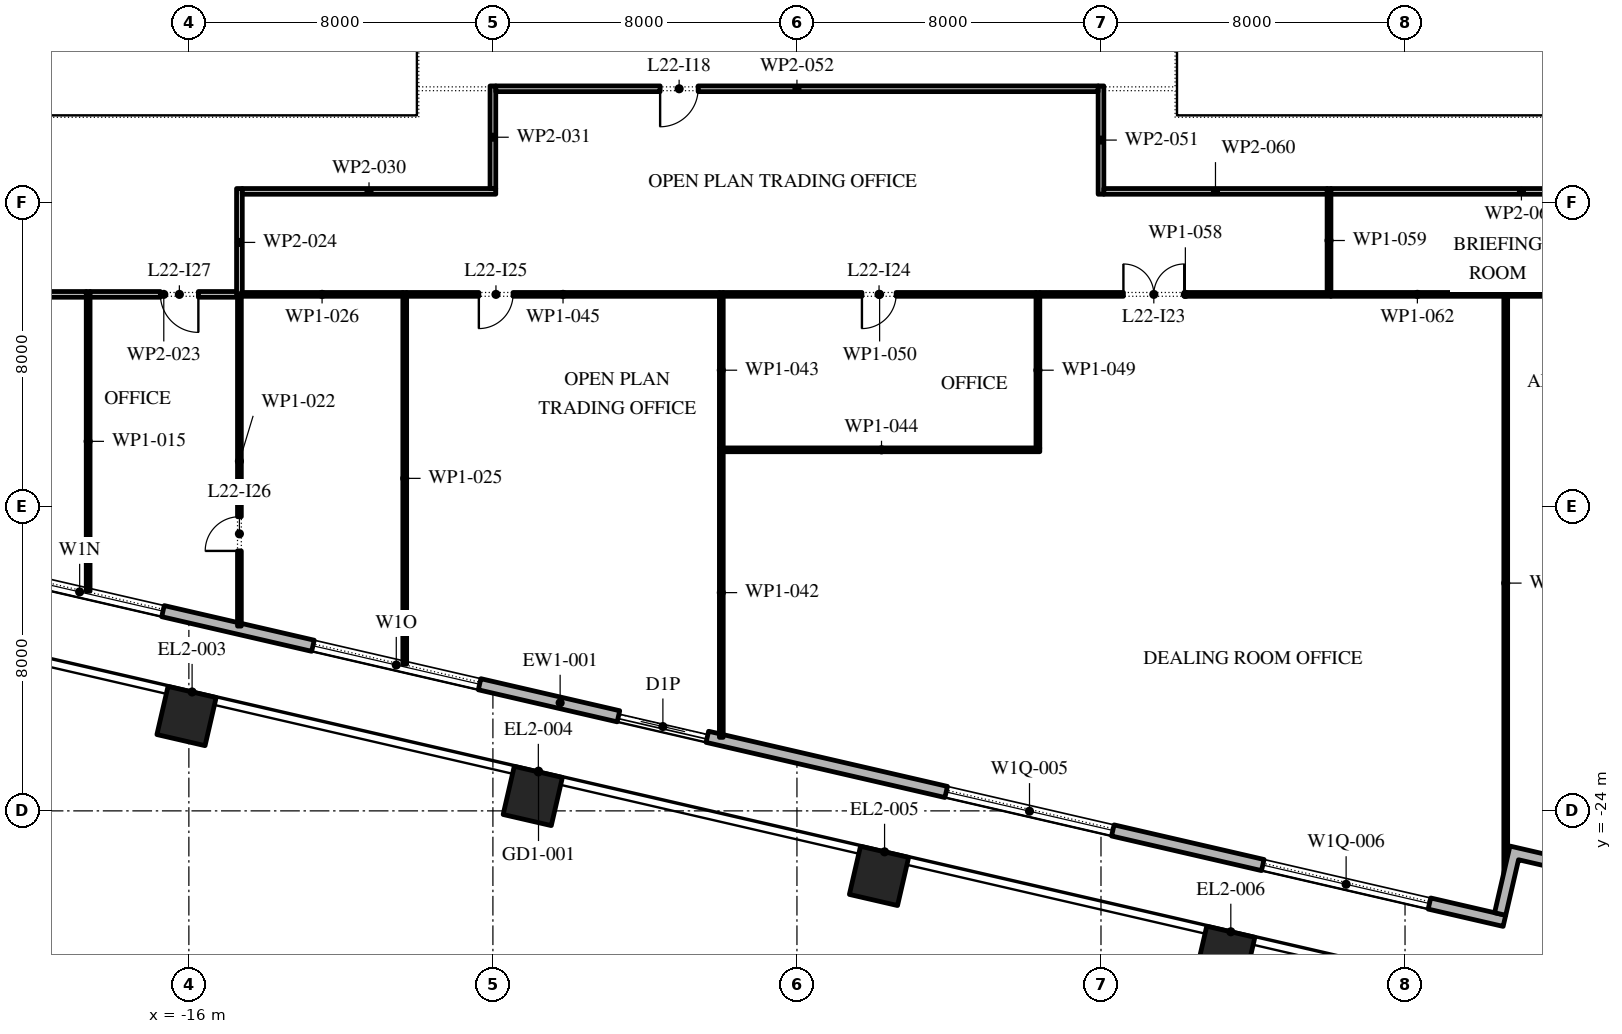
"""IFC4 building model, lengths in metres.
Left out: names, types, materials, properties, quantities, classifications, styles, units other than length and angle.
Written with IfcOpenShell. Run it as: python <this file> out.ifc"""

import sys

from ifc_helpers import new_model, si_unit, direction, frame, frame_2d, origin, origin_2d, place, context, subcontext, project, spatial, polyline, rectangle, outline, extrude, element, fill, save


model = new_model("IFC4")
c1 = context("Model", 3, precision=1e-05, world=origin(), true_north=direction((0.0, 1.0)))
c2 = subcontext(c1, "Body", "Model", "MODEL_VIEW")
j1 = project(units=[si_unit("LENGTHUNIT", "METRE"), si_unit("PLANEANGLEUNIT", "RADIAN")], contexts=[c1])
p1 = place(None, origin())
s1 = spatial("IfcSite", under=j1, at=p1, CompositionType="ELEMENT")
p2 = place(p1, origin())
s2 = spatial("IfcBuilding", under=s1, at=p2, CompositionType="ELEMENT")
p3 = place(p2, frame((0.0, 0.0, 105.6)))
s3 = spatial("IfcBuildingStorey", under=s2, at=p3, CompositionType="ELEMENT", Elevation=105.6)
for number, where, z_axis, x_axis in (
    (1, (-16.061, -21.505, 0.0), (0.0, 0.0, 1.0), (0.974, -0.225, 0.0)),
    (2, (-6.951, -23.608, 0.0), (0.0, 0.0, 1.0), (0.974, -0.225, 0.0)),
    (3, (2.159, -25.711, 0.0), (0.0, 0.0, 1.0), (0.974, -0.225, 0.0)),
    (4, (11.27, -27.815, 0.0), (0.0, 0.0, 1.0), (0.974, -0.225, 0.0)),
):
    element("IfcColumn", number, at=place(p3, frame(where, z_axis=z_axis, x_axis=x_axis)), inside=s3, PredefinedType="COLUMN", context=c2, shape_type="SweptSolid", body=[
        extrude(rectangle(XDim=1.3, YDim=1.3, at=origin_2d()), origin(), (0.0, 0.0, 1.0), 4.2),
    ])
p4 = place(p3, frame((-31.078, -15.421, 0.0), z_axis=(0.0, 0.0, 1.0), x_axis=(0.974370456532, -0.224949357493, 0.0)))
e5 = element("IfcWall", 5, at=p4, inside=s3, PredefinedType="STANDARD", context=c2, shape_type="SweptSolid", body=[
    extrude(rectangle(XDim=51.0, YDim=0.3, at=frame_2d((25.5, 0.0))), origin(), (0.0, 0.0, 1.0), 4.0),
])
p5 = place(p4, frame((1.875, 0.0, 0.45)))
e6 = element("IfcOpeningElement", 6, at=p5, cuts=e5, PredefinedType="OPENING", context=c2, shape_type="SweptSolid", body=[
    extrude(rectangle(XDim=4.5, YDim=2.65, at=frame_2d((2.25, 1.325))), frame((0.0, 0.16, 0.0), z_axis=(0.0, -1.0, 0.0), x_axis=(1.0, 0.0, 0.0)), (0.0, 0.0, 1.0), 0.32),
])
p6 = place(p4, frame((10.275, 0.0, 0.45)))
e7 = element("IfcOpeningElement", 7, at=p6, cuts=e5, PredefinedType="OPENING", context=c2, shape_type="SweptSolid", body=[
    extrude(rectangle(XDim=4.5, YDim=2.525, at=frame_2d((2.25, 1.262))), frame((0.0, 0.16, 0.0), z_axis=(0.0, -1.0, 0.0), x_axis=(1.0, 0.0, 0.0)), (0.0, 0.0, 1.0), 0.32),
])
p7 = place(p4, frame((18.825, 0.0, 0.45)))
e8 = element("IfcOpeningElement", 8, at=p7, cuts=e5, PredefinedType="OPENING", context=c2, shape_type="SweptSolid", body=[
    extrude(rectangle(XDim=4.5, YDim=2.5, at=frame_2d((2.25, 1.25))), frame((0.0, 0.16, 0.0), z_axis=(0.0, -1.0, 0.0), x_axis=(1.0, 0.0, 0.0)), (0.0, 0.0, 1.0), 0.32),
])
p8 = place(p4, frame((27.075, 0.0, 0.0)))
e9 = element("IfcOpeningElement", 9, at=p8, cuts=e5, PredefinedType="OPENING", context=c2, shape_type="SweptSolid", body=[
    extrude(rectangle(XDim=2.4, YDim=2.9, at=frame_2d((1.2, 1.45))), frame((0.0, 0.16, 0.0), z_axis=(0.0, -1.0, 0.0), x_axis=(1.0, 0.0, 0.0)), (0.0, 0.0, 1.0), 0.32),
])
p9 = place(p4, frame((35.925, 0.0, 0.45)))
e10 = element("IfcOpeningElement", 10, at=p9, cuts=e5, PredefinedType="OPENING", context=c2, shape_type="SweptSolid", body=[
    extrude(rectangle(XDim=4.5, YDim=2.45, at=frame_2d((2.25, 1.225))), frame((0.0, 0.16, 0.0), z_axis=(0.0, -1.0, 0.0), x_axis=(1.0, 0.0, 0.0)), (0.0, 0.0, 1.0), 0.32),
])
p10 = place(p4, frame((44.475, 0.0, 0.45)))
e11 = element("IfcOpeningElement", 11, at=p10, cuts=e5, PredefinedType="OPENING", context=c2, shape_type="SweptSolid", body=[
    extrude(rectangle(XDim=4.5, YDim=2.45, at=frame_2d((2.25, 1.225))), frame((0.0, 0.16, 0.0), z_axis=(0.0, -1.0, 0.0), x_axis=(1.0, 0.0, 0.0)), (0.0, 0.0, 1.0), 0.32),
])
p11 = place(p3, origin())
e12 = element("IfcWall", 12, at=p11, inside=s3, PredefinedType="STANDARD", context=c2, shape_type="SweptSolid", body=[
    extrude(outline(polyline([(20.515, -25.331), (20.92, -23.577), (22.967, -24.049), (22.899, -24.342), (21.145, -23.937), (20.74, -25.691), (18.986, -25.286), (18.649, -26.747), (18.357, -26.68), (18.762, -24.926), (20.515, -25.331)])), origin(), (0.0, 0.0, 1.0), 4.0),
])
p12 = place(p3, frame((-18.65, -18.219, 0.0), z_axis=(0.0, 0.0, 1.0), x_axis=(0.0, 1.0, 0.0)))
e13 = element("IfcWall", 13, at=p12, inside=s3, PredefinedType="PARTITIONING", context=c2, shape_type="SweptSolid", body=[
    extrude(rectangle(XDim=7.884, YDim=0.1, at=frame_2d((3.942, 0.0))), origin(), (0.0, 0.0, 1.0), 4.0),
])
p13 = place(p3, frame((-18.7, -10.41, 0.0), z_axis=(0.0, 0.0, 1.0), x_axis=(-1.0, 0.0, 0.0)))
e14 = element("IfcWall", 14, at=p13, inside=s3, PredefinedType="PARTITIONING", context=c2, shape_type="SweptSolid", body=[
    extrude(rectangle(XDim=3.8, YDim=0.15, at=frame_2d((1.9, 0.0))), origin(), (0.0, 0.0, 1.0), 4.0),
])
p14 = place(p13, frame((1.4, 0.0, 0.0)))
e15 = element("IfcOpeningElement", 15, at=p14, cuts=e14, PredefinedType="OPENING", context=c2, shape_type="SweptSolid", body=[
    extrude(rectangle(XDim=1.0, YDim=2.1, at=frame_2d((0.5, 1.05))), frame((0.0, 0.085, 0.0), z_axis=(0.0, -1.0, 0.0), x_axis=(1.0, 0.0, 0.0)), (0.0, 0.0, 1.0), 0.17),
])
p15 = place(p3, frame((-14.67, -19.138, 0.0), z_axis=(0.0, 0.0, 1.0), x_axis=(0.0, 1.0, 0.0)))
e16 = element("IfcWall", 16, at=p15, inside=s3, PredefinedType="PARTITIONING", context=c2, shape_type="SweptSolid", body=[
    extrude(rectangle(XDim=8.678, YDim=0.1, at=frame_2d((4.339, 0.0))), origin(), (0.0, 0.0, 1.0), 4.0),
])
p16 = place(p15, frame((1.978, 0.0, 0.0)))
e17 = element("IfcOpeningElement", 17, at=p16, cuts=e16, PredefinedType="OPENING", context=c2, shape_type="SweptSolid", body=[
    extrude(rectangle(XDim=0.9, YDim=2.1, at=frame_2d((0.45, 1.05))), frame((0.0, 0.06, 0.0), z_axis=(0.0, -1.0, 0.0), x_axis=(1.0, 0.0, 0.0)), (0.0, 0.0, 1.0), 0.12),
])
p17 = place(p3, frame((-14.72, -10.41, 0.0), z_axis=(0.0, 0.0, 1.0), x_axis=(-1.0, 0.0, 0.0)))
e18 = element("IfcWall", 18, at=p17, inside=s3, PredefinedType="PARTITIONING", context=c2, shape_type="SweptSolid", body=[
    extrude(rectangle(XDim=3.88, YDim=0.15, at=frame_2d((1.94, 0.0))), origin(), (0.0, 0.0, 1.0), 4.0),
])
p18 = place(p17, frame((1.03, 0.0, 0.0)))
e19 = element("IfcOpeningElement", 19, at=p18, cuts=e18, PredefinedType="OPENING", context=c2, shape_type="SweptSolid", body=[
    extrude(rectangle(XDim=1.0, YDim=2.1, at=frame_2d((0.5, 1.05))), frame((0.0, 0.085, 0.0), z_axis=(0.0, -1.0, 0.0), x_axis=(1.0, 0.0, 0.0)), (0.0, 0.0, 1.0), 0.17),
])
p19 = place(p3, frame((-14.67, -7.625, 0.0), z_axis=(0.0, 0.0, 1.0), x_axis=(0.0, -1.0, 0.0)))
e20 = element("IfcWall", 20, at=p19, inside=s3, PredefinedType="PARTITIONING", context=c2, shape_type="SweptSolid", body=[
    extrude(rectangle(XDim=2.835, YDim=0.15, at=frame_2d((1.417, 0.0))), origin(), (0.0, 0.0, 1.0), 4.0),
])
p20 = place(p3, frame((-10.32, -20.142, 0.0), z_axis=(0.0, 0.0, 1.0), x_axis=(0.0, 1.0, 0.0)))
e21 = element("IfcWall", 21, at=p20, inside=s3, PredefinedType="PARTITIONING", context=c2, shape_type="SweptSolid", body=[
    extrude(rectangle(XDim=9.782, YDim=0.1, at=frame_2d((4.891, 0.0))), origin(), (0.0, 0.0, 1.0), 4.0),
])
p21 = place(p3, frame((-10.37, -10.41, 0.0), z_axis=(0.0, 0.0, 1.0), x_axis=(-1.0, 0.0, 0.0)))
e22 = element("IfcWall", 22, at=p21, inside=s3, PredefinedType="PARTITIONING", context=c2, shape_type="SweptSolid", body=[
    extrude(rectangle(XDim=4.25, YDim=0.1, at=frame_2d((2.125, 0.0))), origin(), (0.0, 0.0, 1.0), 4.0),
])
p22 = place(p3, frame((-7.925, -7.7, 0.0), z_axis=(0.0, 0.0, 1.0), x_axis=(-1.0, 0.0, 0.0)))
e23 = element("IfcWall", 23, at=p22, inside=s3, PredefinedType="PARTITIONING", context=c2, shape_type="SweptSolid", body=[
    extrude(rectangle(XDim=6.67, YDim=0.15, at=frame_2d((3.335, 0.0))), origin(), (0.0, 0.0, 1.0), 4.0),
])
p23 = place(p3, frame((-8.0, -4.925, 0.0), z_axis=(0.0, 0.0, 1.0), x_axis=(0.0, -1.0, 0.0)))
e24 = element("IfcWall", 24, at=p23, inside=s3, PredefinedType="PARTITIONING", context=c2, shape_type="SweptSolid", body=[
    extrude(rectangle(XDim=2.7, YDim=0.15, at=frame_2d((1.35, 0.0))), origin(), (0.0, 0.0, 1.0), 4.0),
])
p24 = place(p3, frame((-1.99, -22.065, 0.0), z_axis=(0.0, 0.0, 1.0), x_axis=(0.0, 1.0, 0.0)))
e25 = element("IfcWall", 25, at=p24, inside=s3, PredefinedType="PARTITIONING", context=c2, shape_type="SweptSolid", body=[
    extrude(rectangle(XDim=7.615, YDim=0.1, at=frame_2d((3.808, 0.0))), origin(), (0.0, 0.0, 1.0), 4.0),
])
p25 = place(p3, frame((-1.99, -14.45, 0.0), z_axis=(0.0, 0.0, 1.0), x_axis=(0.0, 1.0, 0.0)))
e26 = element("IfcWall", 26, at=p25, inside=s3, PredefinedType="PARTITIONING", context=c2, shape_type="SweptSolid", body=[
    extrude(rectangle(XDim=4.09, YDim=0.1, at=frame_2d((2.045, 0.0))), origin(), (0.0, 0.0, 1.0), 4.0),
])
p26 = place(p3, frame((-1.94, -14.5, 0.0), z_axis=(0.0, 0.0, 1.0), x_axis=(1.0, 0.0, 0.0)))
e27 = element("IfcWall", 27, at=p26, inside=s3, PredefinedType="PARTITIONING", context=c2, shape_type="SweptSolid", body=[
    extrude(rectangle(XDim=8.33, YDim=0.1, at=frame_2d((4.165, 0.0))), origin(), (0.0, 0.0, 1.0), 4.0),
])
p27 = place(p3, frame((-2.04, -10.41, 0.0), z_axis=(0.0, 0.0, 1.0), x_axis=(-1.0, 0.0, 0.0)))
e28 = element("IfcWall", 28, at=p27, inside=s3, PredefinedType="PARTITIONING", context=c2, shape_type="SweptSolid", body=[
    extrude(rectangle(XDim=8.23, YDim=0.1, at=frame_2d((4.115, 0.0))), origin(), (0.0, 0.0, 1.0), 4.0),
])
p28 = place(p27, frame((5.43, 0.0, 0.0)))
e29 = element("IfcOpeningElement", 29, at=p28, cuts=e28, PredefinedType="OPENING", context=c2, shape_type="SweptSolid", body=[
    extrude(rectangle(XDim=0.9, YDim=2.1, at=frame_2d((0.45, 1.05))), frame((0.0, 0.06, 0.0), z_axis=(0.0, -1.0, 0.0), x_axis=(1.0, 0.0, 0.0)), (0.0, 0.0, 1.0), 0.12),
])
p29 = place(p3, frame((6.34, -14.45, 0.0), z_axis=(0.0, 0.0, 1.0), x_axis=(0.0, 1.0, 0.0)))
e30 = element("IfcWall", 30, at=p29, inside=s3, PredefinedType="PARTITIONING", context=c2, shape_type="SweptSolid", body=[
    extrude(rectangle(XDim=4.09, YDim=0.1, at=frame_2d((2.045, 0.0))), origin(), (0.0, 0.0, 1.0), 4.0),
])
p30 = place(p3, frame((6.29, -10.41, 0.0), z_axis=(0.0, 0.0, 1.0), x_axis=(-1.0, 0.0, 0.0)))
e31 = element("IfcWall", 31, at=p30, inside=s3, PredefinedType="PARTITIONING", context=c2, shape_type="SweptSolid", body=[
    extrude(rectangle(XDim=8.23, YDim=0.1, at=frame_2d((4.115, 0.0))), origin(), (0.0, 0.0, 1.0), 4.0),
])
p31 = place(p30, frame((3.68, 0.0, 0.0)))
e32 = element("IfcOpeningElement", 32, at=p31, cuts=e31, PredefinedType="OPENING", context=c2, shape_type="SweptSolid", body=[
    extrude(rectangle(XDim=0.9, YDim=2.1, at=frame_2d((0.45, 1.05))), frame((0.0, 0.06, 0.0), z_axis=(0.0, -1.0, 0.0), x_axis=(1.0, 0.0, 0.0)), (0.0, 0.0, 1.0), 0.12),
])
p32 = place(p3, frame((8.0, -7.775, 0.0), z_axis=(0.0, 0.0, 1.0), x_axis=(0.0, 1.0, 0.0)))
e33 = element("IfcWall", 33, at=p32, inside=s3, PredefinedType="PARTITIONING", context=c2, shape_type="SweptSolid", body=[
    extrude(rectangle(XDim=2.85, YDim=0.15, at=frame_2d((1.425, 0.0))), origin(), (0.0, 0.0, 1.0), 4.0),
])
p33 = place(p3, frame((7.925, -5.0, 0.0), z_axis=(0.0, 0.0, 1.0), x_axis=(-1.0, 0.0, 0.0)))
e34 = element("IfcWall", 34, at=p33, inside=s3, PredefinedType="PARTITIONING", context=c2, shape_type="SweptSolid", body=[
    extrude(rectangle(XDim=15.85, YDim=0.15, at=frame_2d((7.925, 0.0))), origin(), (0.0, 0.0, 1.0), 4.0),
])
p34 = place(p33, frame((10.525, 0.0, 0.0)))
e35 = element("IfcOpeningElement", 35, at=p34, cuts=e34, PredefinedType="OPENING", context=c2, shape_type="SweptSolid", body=[
    extrude(rectangle(XDim=1.0, YDim=2.1, at=frame_2d((0.5, 1.05))), frame((0.0, 0.085, 0.0), z_axis=(0.0, -1.0, 0.0), x_axis=(1.0, 0.0, 0.0)), (0.0, 0.0, 1.0), 0.17),
])
p35 = place(p3, frame((14.05, -10.41, 0.0), z_axis=(0.0, 0.0, 1.0), x_axis=(-1.0, 0.0, 0.0)))
e36 = element("IfcWall", 36, at=p35, inside=s3, PredefinedType="PARTITIONING", context=c2, shape_type="SweptSolid", body=[
    extrude(rectangle(XDim=7.66, YDim=0.1, at=frame_2d((3.83, 0.0))), origin(), (0.0, 0.0, 1.0), 4.0),
])
p36 = place(p35, frame((3.86, 0.0, 0.0)))
e37 = element("IfcOpeningElement", 37, at=p36, cuts=e36, PredefinedType="OPENING", context=c2, shape_type="SweptSolid", body=[
    extrude(rectangle(XDim=1.6, YDim=2.1, at=frame_2d((0.8, 1.05))), frame((0.0, 0.06, 0.0), z_axis=(0.0, -1.0, 0.0), x_axis=(1.0, 0.0, 0.0)), (0.0, 0.0, 1.0), 0.12),
])
p37 = place(p3, frame((14.0, -10.36, 0.0), z_axis=(0.0, 0.0, 1.0), x_axis=(0.0, 1.0, 0.0)))
e38 = element("IfcWall", 38, at=p37, inside=s3, PredefinedType="PARTITIONING", context=c2, shape_type="SweptSolid", body=[
    extrude(rectangle(XDim=2.735, YDim=0.1, at=frame_2d((1.368, 0.0))), origin(), (0.0, 0.0, 1.0), 4.0),
])
p38 = place(p3, frame((13.95, -7.7, 0.0), z_axis=(0.0, 0.0, 1.0), x_axis=(-1.0, 0.0, 0.0)))
e39 = element("IfcWall", 39, at=p38, inside=s3, PredefinedType="PARTITIONING", context=c2, shape_type="SweptSolid", body=[
    extrude(rectangle(XDim=5.875, YDim=0.15, at=frame_2d((2.938, 0.0))), origin(), (0.0, 0.0, 1.0), 4.0),
])
p39 = place(p3, frame((18.65, -25.654, 0.0), z_axis=(0.0, 0.0, 1.0), x_axis=(0.0, 1.0, 0.0)))
e40 = element("IfcWall", 40, at=p39, inside=s3, PredefinedType="PARTITIONING", context=c2, shape_type="SweptSolid", body=[
    extrude(rectangle(XDim=15.294, YDim=0.1, at=frame_2d((7.647, 0.0))), origin(), (0.0, 0.0, 1.0), 4.0),
])
p40 = place(p3, frame((18.6, -10.41, 0.0), z_axis=(0.0, 0.0, 1.0), x_axis=(-1.0, 0.0, 0.0)))
e41 = element("IfcWall", 41, at=p40, inside=s3, PredefinedType="PARTITIONING", context=c2, shape_type="SweptSolid", body=[
    extrude(rectangle(XDim=4.55, YDim=0.1, at=frame_2d((2.275, 0.0))), origin(), (0.0, 0.0, 1.0), 4.0),
])
p41 = place(p3, frame((24.075, -7.7, 0.0), z_axis=(0.0, 0.0, 1.0), x_axis=(-1.0, 0.0, 0.0)))
e42 = element("IfcWall", 42, at=p41, inside=s3, PredefinedType="PARTITIONING", context=c2, shape_type="SweptSolid", body=[
    extrude(rectangle(XDim=10.025, YDim=0.15, at=frame_2d((5.012, 0.0))), origin(), (0.0, 0.0, 1.0), 4.0),
])
p42 = place(p41, frame((2.675, 0.0, 0.0)))
e43 = element("IfcOpeningElement", 43, at=p42, cuts=e42, PredefinedType="OPENING", context=c2, shape_type="SweptSolid", body=[
    extrude(rectangle(XDim=1.0, YDim=2.1, at=frame_2d((0.5, 1.05))), frame((0.0, 0.085, 0.0), z_axis=(0.0, -1.0, 0.0), x_axis=(1.0, 0.0, 0.0)), (0.0, 0.0, 1.0), 0.17),
])
p43 = place(p3, frame((25.05, -10.41, 0.0), z_axis=(0.0, 0.0, 1.0), x_axis=(-1.0, 0.0, 0.0)))
e44 = element("IfcWall", 44, at=p43, inside=s3, PredefinedType="PARTITIONING", context=c2, shape_type="SweptSolid", body=[
    extrude(rectangle(XDim=6.35, YDim=0.1, at=frame_2d((3.175, 0.0))), origin(), (0.0, 0.0, 1.0), 4.0),
])
p44 = place(p43, frame((3.3, 0.0, 0.0)))
e45 = element("IfcOpeningElement", 45, at=p44, cuts=e44, PredefinedType="OPENING", context=c2, shape_type="SweptSolid", body=[
    extrude(rectangle(XDim=0.9, YDim=2.1, at=frame_2d((0.45, 1.05))), frame((0.0, 0.06, 0.0), z_axis=(0.0, -1.0, 0.0), x_axis=(1.0, 0.0, 0.0)), (0.0, 0.0, 1.0), 0.12),
])
p45 = place(p6, origin())
e46 = element("IfcWindow", 46, at=p45, inside=s3, PartitioningType="DOUBLE_PANEL_VERTICAL", PredefinedType="WINDOW", context=c2, shape_type="SweptSolid", body=[
    extrude(rectangle(XDim=4.5, YDim=2.525, at=frame_2d((2.25, 1.262))), frame((0.0, 0.03, 0.0), z_axis=(0.0, -1.0, 0.0), x_axis=(1.0, 0.0, 0.0)), (0.0, 0.0, 1.0), 0.06),
])
fill(e7, e46)
p46 = place(p7, origin())
e47 = element("IfcWindow", 47, at=p46, inside=s3, PartitioningType="DOUBLE_PANEL_VERTICAL", PredefinedType="WINDOW", context=c2, shape_type="SweptSolid", body=[
    extrude(rectangle(XDim=4.5, YDim=2.5, at=frame_2d((2.25, 1.25))), frame((0.0, 0.03, 0.0), z_axis=(0.0, -1.0, 0.0), x_axis=(1.0, 0.0, 0.0)), (0.0, 0.0, 1.0), 0.06),
])
fill(e8, e47)
p47 = place(p8, origin())
e48 = element("IfcDoor", 48, at=p47, inside=s3, OperationType="DOUBLE_DOOR_SLIDING", PredefinedType="DOOR", context=c2, shape_type="SweptSolid", body=[
    extrude(rectangle(XDim=2.4, YDim=2.9, at=frame_2d((1.2, 1.45))), frame((0.0, 0.025, 0.0), z_axis=(0.0, -1.0, 0.0), x_axis=(1.0, 0.0, 0.0)), (0.0, 0.0, 1.0), 0.05),
])
fill(e9, e48)
p48 = place(p9, origin())
e49 = element("IfcWindow", 49, at=p48, inside=s3, PartitioningType="DOUBLE_PANEL_VERTICAL", PredefinedType="WINDOW", context=c2, shape_type="SweptSolid", body=[
    extrude(rectangle(XDim=4.5, YDim=2.45, at=frame_2d((2.25, 1.225))), frame((0.0, 0.03, 0.0), z_axis=(0.0, -1.0, 0.0), x_axis=(1.0, 0.0, 0.0)), (0.0, 0.0, 1.0), 0.06),
])
fill(e10, e49)
p49 = place(p10, origin())
e50 = element("IfcWindow", 50, at=p49, inside=s3, PartitioningType="DOUBLE_PANEL_VERTICAL", PredefinedType="WINDOW", context=c2, shape_type="SweptSolid", body=[
    extrude(rectangle(XDim=4.5, YDim=2.45, at=frame_2d((2.25, 1.225))), frame((0.0, 0.03, 0.0), z_axis=(0.0, -1.0, 0.0), x_axis=(1.0, 0.0, 0.0)), (0.0, 0.0, 1.0), 0.06),
])
fill(e11, e50)
p50 = place(p34, origin())
e51 = element("IfcDoor", 51, at=p50, inside=s3, OperationType="SINGLE_SWING_LEFT", PredefinedType="DOOR", context=c2, shape_type="SweptSolid", body=[
    extrude(rectangle(XDim=1.0, YDim=2.1, at=frame_2d((0.5, 1.05))), frame((0.0, 0.025, 0.0), z_axis=(0.0, -1.0, 0.0), x_axis=(1.0, 0.0, 0.0)), (0.0, 0.0, 1.0), 0.05),
])
fill(e35, e51)
p51 = place(p36, frame((1.6, 0.0, 0.0), z_axis=(0.0, 0.0, 1.0), x_axis=(-1.0, 0.0, 0.0)))
e52 = element("IfcDoor", 52, at=p51, inside=s3, OperationType="SINGLE_SWING_LEFT", PredefinedType="DOOR", context=c2, shape_type="SweptSolid", body=[
    extrude(rectangle(XDim=1.6, YDim=2.1, at=frame_2d((0.8, 1.05))), frame((0.0, 0.025, 0.0), z_axis=(0.0, -1.0, 0.0), x_axis=(1.0, 0.0, 0.0)), (0.0, 0.0, 1.0), 0.05),
])
fill(e37, e52)
p52 = place(p31, origin())
e53 = element("IfcDoor", 53, at=p52, inside=s3, OperationType="SINGLE_SWING_LEFT", PredefinedType="DOOR", context=c2, shape_type="SweptSolid", body=[
    extrude(rectangle(XDim=0.9, YDim=2.1, at=frame_2d((0.45, 1.05))), frame((0.0, 0.025, 0.0), z_axis=(0.0, -1.0, 0.0), x_axis=(1.0, 0.0, 0.0)), (0.0, 0.0, 1.0), 0.05),
])
fill(e32, e53)
p53 = place(p28, origin())
e54 = element("IfcDoor", 54, at=p53, inside=s3, OperationType="SINGLE_SWING_LEFT", PredefinedType="DOOR", context=c2, shape_type="SweptSolid", body=[
    extrude(rectangle(XDim=0.9, YDim=2.1, at=frame_2d((0.45, 1.05))), frame((0.0, 0.025, 0.0), z_axis=(0.0, -1.0, 0.0), x_axis=(1.0, 0.0, 0.0)), (0.0, 0.0, 1.0), 0.05),
])
fill(e29, e54)
p54 = place(p16, origin())
e55 = element("IfcDoor", 55, at=p54, inside=s3, OperationType="SINGLE_SWING_RIGHT", PredefinedType="DOOR", context=c2, shape_type="SweptSolid", body=[
    extrude(rectangle(XDim=0.9, YDim=2.1, at=frame_2d((0.45, 1.05))), frame((0.0, 0.025, 0.0), z_axis=(0.0, -1.0, 0.0), x_axis=(1.0, 0.0, 0.0)), (0.0, 0.0, 1.0), 0.05),
])
fill(e17, e55)
p55 = place(p18, origin())
e56 = element("IfcDoor", 56, at=p55, inside=s3, OperationType="SINGLE_SWING_RIGHT", PredefinedType="DOOR", context=c2, shape_type="SweptSolid", body=[
    extrude(rectangle(XDim=1.0, YDim=2.1, at=frame_2d((0.5, 1.05))), frame((0.0, 0.025, 0.0), z_axis=(0.0, -1.0, 0.0), x_axis=(1.0, 0.0, 0.0)), (0.0, 0.0, 1.0), 0.05),
])
fill(e19, e56)
save(model, sys.argv[1])
